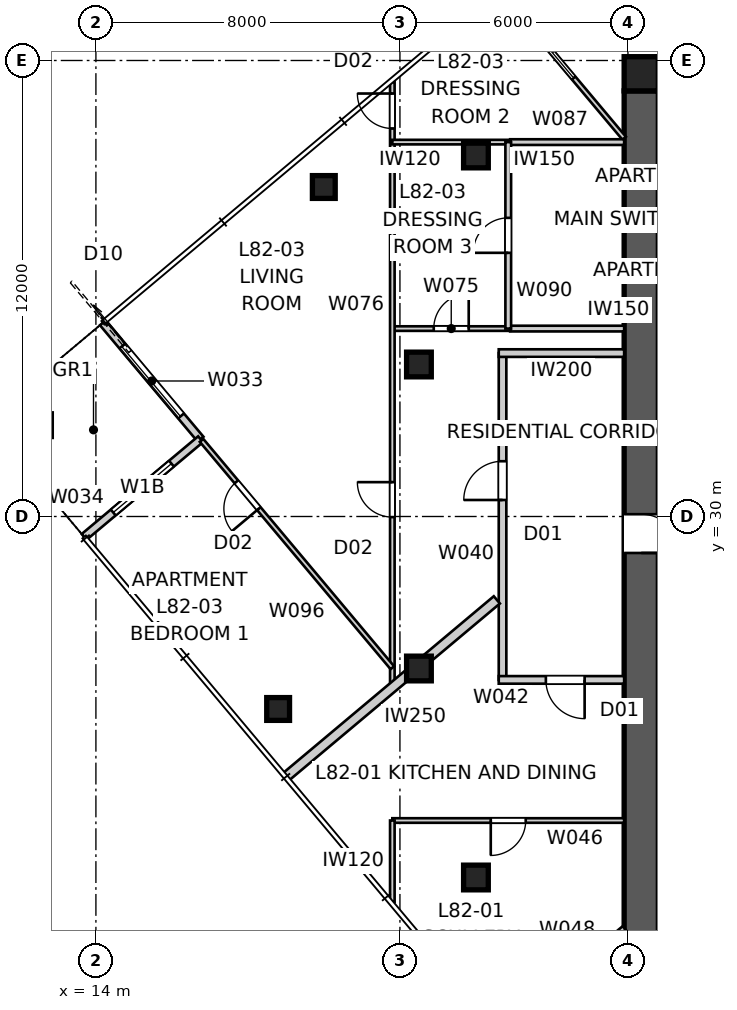
"""IFC4 building model, lengths in metres.
Left out: names, types, materials, properties, quantities, classifications, styles, units other than length and angle.
Written with IfcOpenShell. Run it as: python <this file> out.ifc"""

import sys

from ifc_helpers import new_model, si_unit, direction, frame, frame_2d, origin, origin_2d, place, context, subcontext, project, spatial, polyline, rectangle, outline, extrude, element, fill, save


model = new_model("IFC4")
c1 = context("Model", 3, precision=1e-05, world=origin(), true_north=direction((0.0, 1.0)))
c2 = subcontext(c1, "Body", "Model", "MODEL_VIEW")
j1 = project(units=[si_unit("LENGTHUNIT", "METRE"), si_unit("PLANEANGLEUNIT", "RADIAN")], contexts=[c1])
p1 = place(None, origin())
s1 = spatial("IfcSite", under=j1, at=p1, CompositionType="ELEMENT")
p2 = place(p1, origin())
s2 = spatial("IfcBuilding", under=s1, at=p2, CompositionType="ELEMENT")
p3 = place(p2, frame((0.0, 0.0, 296.4)))
s3 = spatial("IfcBuildingStorey", under=s2, at=p3, CompositionType="ELEMENT", Elevation=296.4)
p4 = place(p3, frame((28.8, 41.65, 0.0), z_axis=(0.0, 0.0, 1.0), x_axis=(1.0, 0.0, 0.0)))
e1 = element("IfcWall", 1, at=p4, inside=s3, PredefinedType="SHEAR", context=c2, shape_type="SweptSolid", body=[
    extrude(outline(polyline([(0.0, -0.45), (22.4, -0.45), (22.4, -0.025), (22.85, -0.025), (22.85, 0.025), (22.4, 0.025), (22.4, 0.45), (0.0, 0.45), (0.0, 0.025), (-0.45, 0.025), (-0.45, -0.025), (0.0, -0.025), (0.0, -0.45)])), origin(), (0.0, 0.0, 1.0), 3.4),
])
p5 = place(p3, frame((28.35, 41.2, 0.0), z_axis=(0.0, 0.0, 1.0), x_axis=(0.0, -1.0, 0.0)))
e2 = element("IfcWall", 2, at=p5, inside=s3, PredefinedType="SHEAR", context=c2, shape_type="SweptSolid", body=[
    extrude(outline(polyline([(0.0, -0.45), (22.4, -0.45), (22.4, -0.025), (22.85, -0.025), (22.85, 0.025), (22.4, 0.025), (22.4, 0.45), (0.0, 0.45), (0.0, 0.025), (-0.45, 0.025), (-0.45, -0.025), (0.0, -0.025), (0.0, -0.45)])), origin(), (0.0, 0.0, 1.0), 3.4),
])
p6 = place(p5, frame((11.14, 0.0, 0.0)))
e3 = element("IfcOpeningElement", 3, at=p6, cuts=e2, PredefinedType="OPENING", context=c2, shape_type="SweptSolid", body=[
    extrude(rectangle(XDim=1.02, YDim=2.4, at=frame_2d((0.51, 1.2))), frame((0.0, 0.46, 0.0), z_axis=(0.0, -1.0, 0.0), x_axis=(1.0, 0.0, 0.0)), (0.0, 0.0, 1.0), 0.92),
])
p7 = place(p3, frame((28.35, 41.65, 0.0), z_axis=(0.0, 0.0, 1.0), x_axis=(1.0, 0.0, 0.0)))
e4 = element("IfcColumn", 4, at=p7, inside=s3, PredefinedType="COLUMN", context=c2, shape_type="SweptSolid", body=[
    extrude(rectangle(XDim=0.9, YDim=0.9, at=origin_2d()), origin(), (0.0, 0.0, 1.0), 3.4),
])
for number, where, z_axis, x_axis in (
    (5, (19.997, 38.671, 0.0), (0.0, 0.0, 1.0), (1.0, 0.0, 0.0)),
    (6, (18.795, 24.935, 0.0), (0.0, 0.0, 1.0), (1.0, 0.0, 0.0)),
):
    element("IfcColumn", number, at=place(p3, frame(where, z_axis=z_axis, x_axis=x_axis)), inside=s3, PredefinedType="COLUMN", context=c2, shape_type="SweptSolid", body=[
        extrude(rectangle(XDim=0.6, YDim=0.6, at=origin_2d()), origin(), (0.0, 0.0, 1.0), 3.4),
    ])
for number, where, z_axis, x_axis in (
    (7, (24.0, 39.5, 0.0), (0.0, 0.0, 1.0), (1.0, 0.0, 0.0)),
    (8, (22.5, 34.0, 0.0), (0.0, 0.0, 1.0), (1.0, 0.0, 0.0)),
    (9, (22.5, 26.0, 0.0), (0.0, 0.0, 1.0), (1.0, 0.0, 0.0)),
    (10, (24.0, 20.5, 0.0), (0.0, 0.0, 1.0), (1.0, 0.0, 0.0)),
):
    element("IfcColumn", number, at=place(p3, frame(where, z_axis=z_axis, x_axis=x_axis)), inside=s3, PredefinedType="COLUMN", context=c2, shape_type="SweptSolid", body=[
        extrude(rectangle(XDim=0.65, YDim=0.65, at=origin_2d()), origin(), (0.0, 0.0, 1.0), 3.4),
    ])
p8 = place(p3, frame((14.183, 35.098, 0.0), z_axis=(0.0, 0.0, 1.0), x_axis=(0.642768287094, -0.766060656284, 0.0)))
e11 = element("IfcWall", 11, at=p8, inside=s3, PredefinedType="SOLIDWALL", context=c2, shape_type="SweptSolid", body=[
    extrude(rectangle(XDim=4.0, YDim=0.2, at=frame_2d((2.0, 0.0))), origin(), (0.0, 0.0, 1.0), 3.2),
])
p9 = place(p8, frame((0.8, 0.0, 0.0)))
e12 = element("IfcOpeningElement", 12, at=p9, cuts=e11, PredefinedType="OPENING", context=c2, shape_type="SweptSolid", body=[
    extrude(rectangle(XDim=2.4, YDim=2.4, at=frame_2d((1.2, 1.2))), frame((0.0, 0.11, 0.0), z_axis=(0.0, -1.0, 0.0), x_axis=(1.0, 0.0, 0.0)), (0.0, 0.0, 1.0), 0.22),
])
p10 = place(p3, frame((16.754, 32.034, 0.0), z_axis=(0.0, 0.0, 1.0), x_axis=(-0.766035437498, -0.642798342015, 0.0)))
e13 = element("IfcWall", 13, at=p10, inside=s3, PredefinedType="SOLIDWALL", context=c2, shape_type="SweptSolid", body=[
    extrude(rectangle(XDim=4.0, YDim=0.2, at=frame_2d((2.0, 0.0))), origin(), (0.0, 0.0, 1.0), 3.2),
])
p11 = place(p10, frame((1.0, 0.0, 0.45)))
e14 = element("IfcOpeningElement", 14, at=p11, cuts=e13, PredefinedType="OPENING", context=c2, shape_type="SweptSolid", body=[
    extrude(rectangle(XDim=2.0, YDim=1.8, at=frame_2d((1.0, 0.9))), frame((0.0, 0.11, 0.0), z_axis=(0.0, -1.0, 0.0), x_axis=(1.0, 0.0, 0.0)), (0.0, 0.0, 1.0), 0.22),
])
p12 = place(p3, frame((24.7, 25.7, 0.0), z_axis=(0.0, 0.0, 1.0), x_axis=(0.0, 1.0, 0.0)))
e15 = element("IfcWall", 15, at=p12, inside=s3, PredefinedType="PARTITIONING", context=c2, shape_type="SweptSolid", body=[
    extrude(rectangle(XDim=8.6, YDim=0.2, at=frame_2d((4.3, 0.0))), origin(), (0.0, 0.0, 1.0), 3.2),
])
p13 = place(p12, frame((4.734, 0.0, 0.0)))
e16 = element("IfcOpeningElement", 16, at=p13, cuts=e15, PredefinedType="OPENING", context=c2, shape_type="SweptSolid", body=[
    extrude(rectangle(XDim=1.02, YDim=2.34, at=frame_2d((0.51, 1.17))), frame((0.0, 0.11, 0.0), z_axis=(0.0, -1.0, 0.0), x_axis=(1.0, 0.0, 0.0)), (0.0, 0.0, 1.0), 0.22),
])
p14 = place(p3, frame((27.9, 34.3, 0.0), z_axis=(0.0, 0.0, 1.0), x_axis=(-1.0, 0.0, 0.0)))
e17 = element("IfcWall", 17, at=p14, inside=s3, PredefinedType="PARTITIONING", context=c2, shape_type="SweptSolid", body=[
    extrude(rectangle(XDim=3.3, YDim=0.2, at=frame_2d((1.65, 0.0))), origin(), (0.0, 0.0, 1.0), 3.2),
])
p15 = place(p3, frame((27.9, 25.7, 0.0), z_axis=(0.0, 0.0, 1.0), x_axis=(-1.0, 0.0, 0.0)))
e18 = element("IfcWall", 18, at=p15, inside=s3, PredefinedType="PARTITIONING", context=c2, shape_type="SweptSolid", body=[
    extrude(rectangle(XDim=3.3, YDim=0.2, at=frame_2d((1.65, 0.0))), origin(), (0.0, 0.0, 1.0), 3.2),
])
p16 = place(p15, frame((1.04, 0.0, 0.0)))
e19 = element("IfcOpeningElement", 19, at=p16, cuts=e18, PredefinedType="OPENING", context=c2, shape_type="SweptSolid", body=[
    extrude(rectangle(XDim=1.02, YDim=2.34, at=frame_2d((0.51, 1.17))), frame((0.0, 0.11, 0.0), z_axis=(0.0, -1.0, 0.0), x_axis=(1.0, 0.0, 0.0)), (0.0, 0.0, 1.0), 0.22),
])
p17 = place(p3, frame((18.993, 23.143, 0.0), z_axis=(0.0, 0.0, 1.0), x_axis=(0.766054150891, 0.642776040237, 0.0)))
e20 = element("IfcWall", 20, at=p17, inside=s3, PredefinedType="PARTITIONING", context=c2, shape_type="SweptSolid", body=[
    extrude(rectangle(XDim=7.254, YDim=0.25, at=frame_2d((3.627, 0.0))), origin(), (0.0, 0.0, 1.0), 3.2),
])
p18 = place(p3, frame((27.9, 22.0, 0.0), z_axis=(0.0, 0.0, 1.0), x_axis=(-1.0, 0.0, 0.0)))
e21 = element("IfcWall", 21, at=p18, inside=s3, PredefinedType="PARTITIONING", context=c2, shape_type="SweptSolid", body=[
    extrude(rectangle(XDim=6.1, YDim=0.12, at=frame_2d((3.05, 0.0))), origin(), (0.0, 0.0, 1.0), 3.2),
])
p19 = place(p18, frame((2.59, 0.0, 0.0)))
e22 = element("IfcOpeningElement", 22, at=p19, cuts=e21, PredefinedType="OPENING", context=c2, shape_type="SweptSolid", body=[
    extrude(rectangle(XDim=0.92, YDim=2.34, at=frame_2d((0.46, 1.17))), frame((0.0, 0.07, 0.0), z_axis=(0.0, -1.0, 0.0), x_axis=(1.0, 0.0, 0.0)), (0.0, 0.0, 1.0), 0.14),
])
p20 = place(p3, frame((21.8, 22.0, 0.0), z_axis=(0.0, 0.0, 1.0), x_axis=(0.0, -1.0, 0.0)))
e23 = element("IfcWall", 23, at=p20, inside=s3, PredefinedType="PARTITIONING", context=c2, shape_type="SweptSolid", body=[
    extrude(rectangle(XDim=2.14, YDim=0.12, at=frame_2d((1.07, 0.0))), origin(), (0.0, 0.0, 1.0), 3.2),
])
p21 = place(p3, frame((27.9, 19.172, 0.0), z_axis=(0.0, 0.0, 1.0), x_axis=(-0.766017381482, -0.642819859111, 0.0)))
e24 = element("IfcWall", 24, at=p21, inside=s3, PredefinedType="PARTITIONING", context=c2, shape_type="SweptSolid", body=[
    extrude(rectangle(XDim=4.231, YDim=0.12, at=frame_2d((2.115, 0.0))), origin(), (0.0, 0.0, 1.0), 3.2),
])
p22 = place(p21, frame((1.676, 0.0, 0.0)))
e25 = element("IfcOpeningElement", 25, at=p22, cuts=e24, PredefinedType="OPENING", context=c2, shape_type="SweptSolid", body=[
    extrude(rectangle(XDim=0.92, YDim=2.0, at=frame_2d((0.46, 1.0))), frame((0.0, 0.07, 0.0), z_axis=(0.0, -1.0, 0.0), x_axis=(1.0, 0.0, 0.0)), (0.0, 0.0, 1.0), 0.14),
])
p23 = place(p3, frame((24.9, 34.945, 0.0), z_axis=(0.0, 0.0, 1.0), x_axis=(1.0, 0.0, 0.0)))
e26 = element("IfcWall", 26, at=p23, inside=s3, PredefinedType="SOLIDWALL", context=c2, shape_type="SweptSolid", body=[
    extrude(rectangle(XDim=3.0, YDim=0.15, at=frame_2d((1.5, 0.0))), origin(), (0.0, 0.0, 1.0), 3.2),
])
p24 = place(p3, frame((21.8, 34.945, 0.0), z_axis=(0.0, 0.0, 1.0), x_axis=(1.0, 0.0, 0.0)))
e27 = element("IfcWall", 27, at=p24, inside=s3, PredefinedType="PARTITIONING", context=c2, shape_type="SweptSolid", body=[
    extrude(rectangle(XDim=3.1, YDim=0.12, at=frame_2d((1.55, 0.0))), origin(), (0.0, 0.0, 1.0), 3.2),
])
p25 = place(p24, frame((1.09, 0.0, 0.0)))
e28 = element("IfcOpeningElement", 28, at=p25, cuts=e27, PredefinedType="OPENING", context=c2, shape_type="SweptSolid", body=[
    extrude(rectangle(XDim=0.92, YDim=2.1, at=frame_2d((0.46, 1.05))), frame((0.0, 0.07, 0.0), z_axis=(0.0, -1.0, 0.0), x_axis=(1.0, 0.0, 0.0)), (0.0, 0.0, 1.0), 0.14),
])
p26 = place(p3, frame((21.8, 25.498, 0.0), z_axis=(0.0, 0.0, 1.0), x_axis=(0.0, 1.0, 0.0)))
e29 = element("IfcWall", 29, at=p26, inside=s3, PredefinedType="PARTITIONING", context=c2, shape_type="SweptSolid", body=[
    extrude(rectangle(XDim=15.939, YDim=0.12, at=frame_2d((7.969, 0.0))), origin(), (0.0, 0.0, 1.0), 3.2),
])
p27 = place(p26, frame((4.486, 0.0, 0.0)))
e30 = element("IfcOpeningElement", 30, at=p27, cuts=e29, PredefinedType="OPENING", context=c2, shape_type="SweptSolid", body=[
    extrude(rectangle(XDim=0.92, YDim=2.34, at=frame_2d((0.46, 1.17))), frame((0.0, 0.07, 0.0), z_axis=(0.0, -1.0, 0.0), x_axis=(1.0, 0.0, 0.0)), (0.0, 0.0, 1.0), 0.14),
])
p28 = place(p26, frame((14.713, 0.0, 0.0)))
e31 = element("IfcOpeningElement", 31, at=p28, cuts=e29, PredefinedType="OPENING", context=c2, shape_type="SweptSolid", body=[
    extrude(rectangle(XDim=0.92, YDim=2.34, at=frame_2d((0.46, 1.17))), frame((0.0, 0.07, 0.0), z_axis=(0.0, -1.0, 0.0), x_axis=(1.0, 0.0, 0.0)), (0.0, 0.0, 1.0), 0.14),
])
p29 = place(p3, frame((30.172, 42.1, 0.0), z_axis=(0.0, 0.0, 1.0), x_axis=(-0.532913303443, 0.846169847616, 0.0)))
e32 = element("IfcWall", 32, at=p29, inside=s3, PredefinedType="PARTITIONING", context=c2, shape_type="SweptSolid", body=[
    extrude(rectangle(XDim=4.919, YDim=0.12, at=frame_2d((2.46, 0.0))), origin(), (0.0, 0.0, 1.0), 3.2),
])
p30 = place(p29, frame((1.923, 0.0, 0.0)))
e33 = element("IfcOpeningElement", 33, at=p30, cuts=e32, PredefinedType="OPENING", context=c2, shape_type="SweptSolid", body=[
    extrude(rectangle(XDim=0.96, YDim=2.0, at=frame_2d((0.48, 1.0))), frame((0.0, 0.07, 0.0), z_axis=(0.0, -1.0, 0.0), x_axis=(1.0, 0.0, 0.0)), (0.0, 0.0, 1.0), 0.14),
])
p31 = place(p3, frame((24.65, 43.828, 0.0), z_axis=(0.0, 0.0, 1.0), x_axis=(0.64277866568, -0.766051947943, 0.0)))
e34 = element("IfcWall", 34, at=p31, inside=s3, PredefinedType="PARTITIONING", context=c2, shape_type="SweptSolid", body=[
    extrude(rectangle(XDim=5.056, YDim=0.12, at=frame_2d((2.528, 0.0))), origin(), (0.0, 0.0, 1.0), 3.2),
])
p32 = place(p31, frame((2.028, 0.0, 0.0)))
e35 = element("IfcOpeningElement", 35, at=p32, cuts=e34, PredefinedType="OPENING", context=c2, shape_type="SweptSolid", body=[
    extrude(rectangle(XDim=0.96, YDim=2.0, at=frame_2d((0.48, 1.0))), frame((0.0, 0.07, 0.0), z_axis=(0.0, -1.0, 0.0), x_axis=(1.0, 0.0, 0.0)), (0.0, 0.0, 1.0), 0.14),
])
p33 = place(p3, frame((27.9, 39.852, 0.0), z_axis=(0.0, 0.0, 1.0), x_axis=(-1.0, 0.0, 0.0)))
e36 = element("IfcWall", 36, at=p33, inside=s3, PredefinedType="SOLIDWALL", context=c2, shape_type="SweptSolid", body=[
    extrude(rectangle(XDim=3.0, YDim=0.15, at=frame_2d((1.5, 0.0))), origin(), (0.0, 0.0, 1.0), 3.2),
])
p34 = place(p3, frame((24.9, 39.852, 0.0), z_axis=(0.0, 0.0, 1.0), x_axis=(-1.0, 0.0, 0.0)))
e37 = element("IfcWall", 37, at=p34, inside=s3, PredefinedType="PARTITIONING", context=c2, shape_type="SweptSolid", body=[
    extrude(rectangle(XDim=3.1, YDim=0.12, at=frame_2d((1.55, 0.0))), origin(), (0.0, 0.0, 1.0), 3.2),
])
p35 = place(p3, frame((24.85, 34.945, 0.0), z_axis=(0.0, 0.0, 1.0), x_axis=(0.0, 1.0, 0.0)))
e38 = element("IfcWall", 38, at=p35, inside=s3, PredefinedType="SOLIDWALL", context=c2, shape_type="SweptSolid", body=[
    extrude(rectangle(XDim=4.907, YDim=0.15, at=frame_2d((2.454, 0.0))), origin(), (0.0, 0.0, 1.0), 3.2),
])
p36 = place(p35, frame((1.994, 0.0, 0.0)))
e39 = element("IfcOpeningElement", 39, at=p36, cuts=e38, PredefinedType="OPENING", context=c2, shape_type="SweptSolid", body=[
    extrude(rectangle(XDim=0.92, YDim=2.34, at=frame_2d((0.46, 1.17))), frame((0.0, 0.085, 0.0), z_axis=(0.0, -1.0, 0.0), x_axis=(1.0, 0.0, 0.0)), (0.0, 0.0, 1.0), 0.17),
])
p37 = place(p3, frame((21.8, 26.021, 0.0), z_axis=(0.0, 0.0, 1.0), x_axis=(-0.642785106342, 0.766046543668, 0.0)))
e40 = element("IfcWall", 40, at=p37, inside=s3, PredefinedType="PARTITIONING", context=c2, shape_type="SweptSolid", body=[
    extrude(rectangle(XDim=7.81, YDim=0.12, at=frame_2d((3.905, 0.0))), origin(), (0.0, 0.0, 1.0), 3.2),
])
p38 = place(p37, frame((5.465, 0.0, 0.0)))
e41 = element("IfcOpeningElement", 41, at=p38, cuts=e40, PredefinedType="OPENING", context=c2, shape_type="SweptSolid", body=[
    extrude(rectangle(XDim=0.92, YDim=2.34, at=frame_2d((0.46, 1.17))), frame((0.0, 0.07, 0.0), z_axis=(0.0, -1.0, 0.0), x_axis=(1.0, 0.0, 0.0)), (0.0, 0.0, 1.0), 0.14),
])
p39 = place(p9, origin())
e42 = element("IfcDoor", 42, at=p39, inside=s3, OperationType="SLIDING_TO_LEFT", PredefinedType="DOOR", context=c2, shape_type="SweptSolid", body=[
    extrude(rectangle(XDim=2.4, YDim=2.4, at=frame_2d((1.2, 1.2))), frame((0.0, 0.025, 0.0), z_axis=(0.0, -1.0, 0.0), x_axis=(1.0, 0.0, 0.0)), (0.0, 0.0, 1.0), 0.05),
])
fill(e12, e42)
p40 = place(p11, origin())
e43 = element("IfcWindow", 43, at=p40, inside=s3, PartitioningType="SINGLE_PANEL", PredefinedType="WINDOW", context=c2, shape_type="SweptSolid", body=[
    extrude(rectangle(XDim=2.0, YDim=1.8, at=frame_2d((1.0, 0.9))), frame((0.0, 0.03, 0.0), z_axis=(0.0, -1.0, 0.0), x_axis=(1.0, 0.0, 0.0)), (0.0, 0.0, 1.0), 0.06),
])
fill(e14, e43)
p41 = place(p13, origin())
e44 = element("IfcDoor", 44, at=p41, inside=s3, OperationType="SINGLE_SWING_LEFT", PredefinedType="DOOR", context=c2, shape_type="SweptSolid", body=[
    extrude(rectangle(XDim=1.02, YDim=2.34, at=frame_2d((0.51, 1.17))), frame((0.0, 0.025, 0.0), z_axis=(0.0, -1.0, 0.0), x_axis=(1.0, 0.0, 0.0)), (0.0, 0.0, 1.0), 0.05),
])
fill(e16, e44)
p42 = place(p16, origin())
e45 = element("IfcDoor", 45, at=p42, inside=s3, OperationType="SINGLE_SWING_LEFT", PredefinedType="DOOR", context=c2, shape_type="SweptSolid", body=[
    extrude(rectangle(XDim=1.02, YDim=2.34, at=frame_2d((0.51, 1.17))), frame((0.0, 0.025, 0.0), z_axis=(0.0, -1.0, 0.0), x_axis=(1.0, 0.0, 0.0)), (0.0, 0.0, 1.0), 0.05),
])
fill(e19, e45)
p43 = place(p27, origin())
e46 = element("IfcDoor", 46, at=p43, inside=s3, OperationType="SINGLE_SWING_RIGHT", PredefinedType="DOOR", context=c2, shape_type="SweptSolid", body=[
    extrude(rectangle(XDim=0.92, YDim=2.34, at=frame_2d((0.46, 1.17))), frame((0.0, 0.025, 0.0), z_axis=(0.0, -1.0, 0.0), x_axis=(1.0, 0.0, 0.0)), (0.0, 0.0, 1.0), 0.05),
])
fill(e30, e46)
p44 = place(p25, origin())
e47 = element("IfcDoor", 47, at=p44, inside=s3, OperationType="SINGLE_SWING_RIGHT", PredefinedType="DOOR", context=c2, shape_type="SweptSolid", body=[
    extrude(rectangle(XDim=0.92, YDim=2.1, at=frame_2d((0.46, 1.05))), frame((0.0, 0.025, 0.0), z_axis=(0.0, -1.0, 0.0), x_axis=(1.0, 0.0, 0.0)), (0.0, 0.0, 1.0), 0.05),
])
fill(e28, e47)
p45 = place(p19, origin())
e48 = element("IfcDoor", 48, at=p45, inside=s3, OperationType="SINGLE_SWING_RIGHT", PredefinedType="DOOR", context=c2, shape_type="SweptSolid", body=[
    extrude(rectangle(XDim=0.92, YDim=2.34, at=frame_2d((0.46, 1.17))), frame((0.0, 0.025, 0.0), z_axis=(0.0, -1.0, 0.0), x_axis=(1.0, 0.0, 0.0)), (0.0, 0.0, 1.0), 0.05),
])
fill(e22, e48)
p46 = place(p38, origin())
e49 = element("IfcDoor", 49, at=p46, inside=s3, OperationType="SINGLE_SWING_LEFT", PredefinedType="DOOR", context=c2, shape_type="SweptSolid", body=[
    extrude(rectangle(XDim=0.92, YDim=2.34, at=frame_2d((0.46, 1.17))), frame((0.0, 0.025, 0.0), z_axis=(0.0, -1.0, 0.0), x_axis=(1.0, 0.0, 0.0)), (0.0, 0.0, 1.0), 0.05),
])
fill(e41, e49)
p47 = place(p28, origin())
e50 = element("IfcDoor", 50, at=p47, inside=s3, OperationType="SINGLE_SWING_RIGHT", PredefinedType="DOOR", context=c2, shape_type="SweptSolid", body=[
    extrude(rectangle(XDim=0.92, YDim=2.34, at=frame_2d((0.46, 1.17))), frame((0.0, 0.025, 0.0), z_axis=(0.0, -1.0, 0.0), x_axis=(1.0, 0.0, 0.0)), (0.0, 0.0, 1.0), 0.05),
])
fill(e31, e50)
p48 = place(p36, origin())
e51 = element("IfcDoor", 51, at=p48, inside=s3, OperationType="SINGLE_SWING_LEFT", PredefinedType="DOOR", context=c2, shape_type="SweptSolid", body=[
    extrude(rectangle(XDim=0.92, YDim=2.34, at=frame_2d((0.46, 1.17))), frame((0.0, 0.025, 0.0), z_axis=(0.0, -1.0, 0.0), x_axis=(1.0, 0.0, 0.0)), (0.0, 0.0, 1.0), 0.05),
])
fill(e39, e51)
p49 = place(p32, origin())
e52 = element("IfcDoor", 52, at=p49, inside=s3, OperationType="SLIDING_TO_LEFT", PredefinedType="DOOR", context=c2, shape_type="SweptSolid", body=[
    extrude(rectangle(XDim=0.96, YDim=2.0, at=frame_2d((0.48, 1.0))), frame((0.0, 0.025, 0.0), z_axis=(0.0, -1.0, 0.0), x_axis=(1.0, 0.0, 0.0)), (0.0, 0.0, 1.0), 0.05),
])
fill(e35, e52)
p50 = place(p6, origin())
e53 = element("IfcDoor", 53, at=p50, inside=s3, OperationType="SINGLE_SWING_RIGHT", PredefinedType="DOOR", context=c2, shape_type="SweptSolid", body=[
    extrude(rectangle(XDim=1.02, YDim=2.4, at=frame_2d((0.51, 1.2))), frame((0.0, 0.025, 0.0), z_axis=(0.0, -1.0, 0.0), x_axis=(1.0, 0.0, 0.0)), (0.0, 0.0, 1.0), 0.05),
])
fill(e3, e53)
save(model, sys.argv[1])
